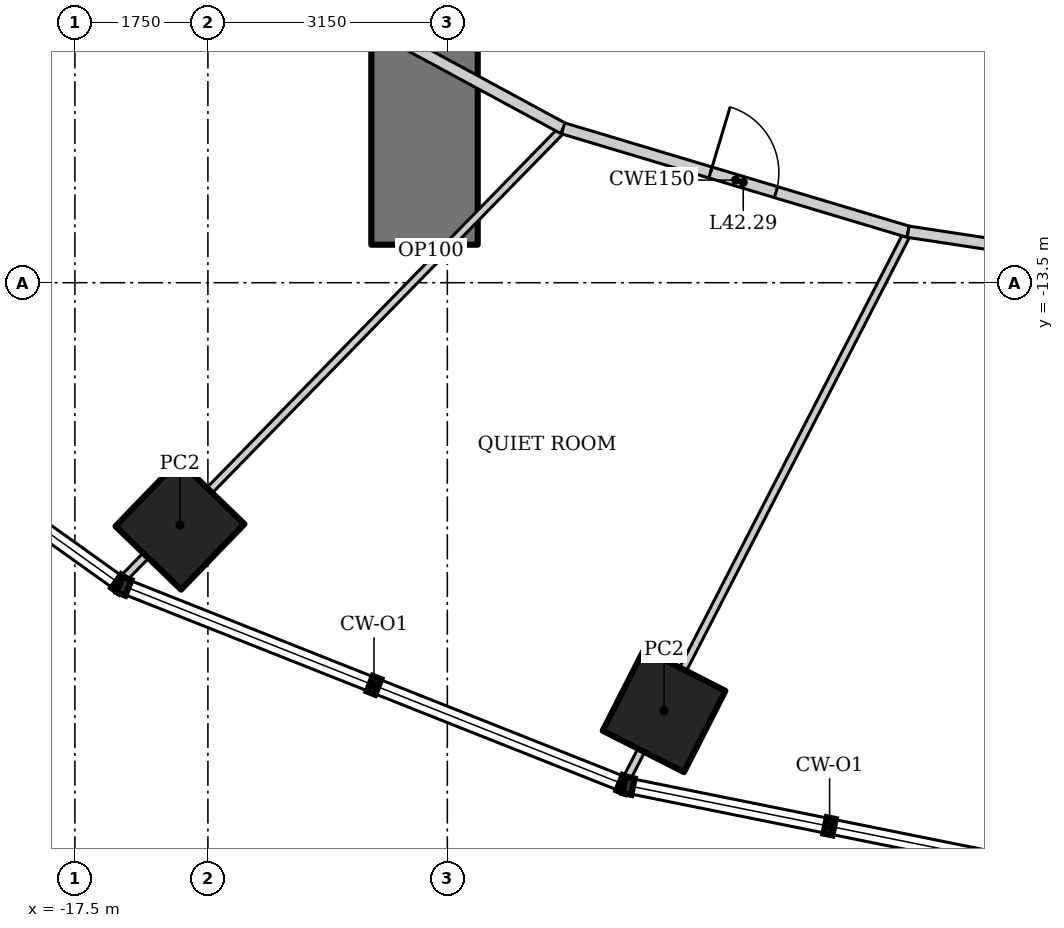
"""IFC4 building model, lengths in metres.
Left out: names, types, materials, properties, quantities, classifications, styles, units other than length and angle.
Written with IfcOpenShell. Run it as: python <this file> out.ifc"""

import sys

from ifc_helpers import new_model, si_unit, direction, frame, frame_2d, origin, origin_2d, place, context, subcontext, project, spatial, rectangle, hollow_rectangle, extrude, element, fill, save


model = new_model("IFC4")
c1 = context("Model", 3, precision=1e-05, world=origin(), true_north=direction((0.0, 1.0)))
c2 = subcontext(c1, "Body", "Model", "MODEL_VIEW")
j1 = project(units=[si_unit("LENGTHUNIT", "METRE"), si_unit("PLANEANGLEUNIT", "RADIAN")], contexts=[c1])
p1 = place(None, origin())
s1 = spatial("IfcSite", under=j1, at=p1, CompositionType="ELEMENT")
p2 = place(p1, origin())
s2 = spatial("IfcBuilding", under=s1, at=p2, CompositionType="ELEMENT")
p3 = place(p2, frame((0.0, 0.0, 180.4)))
s3 = spatial("IfcBuildingStorey", under=s2, at=p3, CompositionType="ELEMENT", Elevation=180.4)
for number, where, z_axis, x_axis in (
    (1, (-16.118, -16.69, 0.0), (0.0, 0.0, 1.0), (0.695, 0.719, 0.0)),
    (2, (-9.749, -19.133, 0.0), (0.0, 0.0, 1.0), (0.454, 0.891, 0.0)),
):
    element("IfcColumn", number, at=place(p3, frame(where, z_axis=z_axis, x_axis=x_axis)), inside=s3, PredefinedType="COLUMN", context=c2, shape_type="SweptSolid", body=[
        extrude(hollow_rectangle(XDim=1.2, YDim=1.2, WallThickness=0.1, at=origin_2d()), origin(), (0.0, 0.0, 1.0), 4.2),
    ])
p4 = place(p3, frame((-12.9, 13.0, 0.0), z_axis=(0.0, 0.0, 1.0), x_axis=(0.0, -1.0, 0.0)))
e3 = element("IfcWall", 3, at=p4, inside=s3, PredefinedType="SHEAR", context=c2, shape_type="SweptSolid", body=[
    extrude(rectangle(XDim=26.0, YDim=1.4, at=frame_2d((13.0, 0.0))), origin(), (0.0, 0.0, 1.0), 4.2),
])
p5 = place(p4, frame((12.1, 0.0, 0.0)))
e4 = element("IfcOpeningElement", 4, at=p5, cuts=e3, PredefinedType="OPENING", context=c2, shape_type="SweptSolid", body=[
    extrude(rectangle(XDim=1.8, YDim=2.1, at=frame_2d((0.9, 1.05))), frame((0.0, 0.71, 0.0), z_axis=(0.0, -1.0, 0.0), x_axis=(1.0, 0.0, 0.0)), (0.0, 0.0, 1.0), 1.42),
])
p6 = place(p3, frame((-16.882, -17.414, 0.0), z_axis=(0.0, 0.0, 1.0), x_axis=(0.698758056249, 0.715358077348, 0.0)))
e5 = element("IfcWall", 5, at=p6, inside=s3, PredefinedType="PARTITIONING", context=c2, shape_type="SweptSolid", body=[
    extrude(rectangle(XDim=8.31, YDim=0.1, at=frame_2d((4.155, 0.0))), origin(), (0.0, 0.0, 1.0), 3.321),
])
p7 = place(p3, frame((-10.253, -20.052, 0.0), z_axis=(0.0, 0.0, 1.0), x_axis=(0.457535449567, 0.889191381194, 0.0)))
e6 = element("IfcWall", 6, at=p7, inside=s3, PredefinedType="PARTITIONING", context=c2, shape_type="SweptSolid", body=[
    extrude(rectangle(XDim=8.123, YDim=0.1, at=frame_2d((4.061, 0.0))), origin(), (0.0, 0.0, 1.0), 3.349),
])
p8 = place(p3, frame((-15.696, -8.969, 0.0), z_axis=(0.0, 0.0, 1.0), x_axis=(0.879436285334, -0.476016617397, 0.0)))
e7 = element("IfcWall", 7, at=p8, inside=s3, PredefinedType="PARTITIONING", context=c2, shape_type="SweptSolid", body=[
    extrude(rectangle(XDim=5.253, YDim=0.15, at=frame_2d((2.626, 0.0))), origin(), (0.0, 0.0, 1.0), 4.05),
])
p9 = place(p3, frame((-11.076, -11.469, 0.0), z_axis=(0.0, 0.0, 1.0), x_axis=(0.957933992798, -0.286988615527, 0.0)))
e8 = element("IfcWall", 8, at=p9, inside=s3, PredefinedType="PARTITIONING", context=c2, shape_type="SweptSolid", body=[
    extrude(rectangle(XDim=4.738, YDim=0.15, at=frame_2d((2.369, 0.0))), origin(), (0.0, 0.0, 1.0), 4.05),
])
p10 = place(p9, frame((2.023, 0.0, 0.0)))
e9 = element("IfcOpeningElement", 9, at=p10, cuts=e8, PredefinedType="OPENING", context=c2, shape_type="SweptSolid", body=[
    extrude(rectangle(XDim=0.9, YDim=2.1, at=frame_2d((0.45, 1.05))), frame((0.0, 0.085, 0.0), z_axis=(0.0, -1.0, 0.0), x_axis=(1.0, 0.0, 0.0)), (0.0, 0.0, 1.0), 0.17),
])
p11 = place(p3, frame((-6.537, -12.829, 0.0), z_axis=(0.0, 0.0, 1.0), x_axis=(0.988668719464, -0.150113833987, 0.0)))
e10 = element("IfcWall", 10, at=p11, inside=s3, PredefinedType="PARTITIONING", context=c2, shape_type="SweptSolid", body=[
    extrude(rectangle(XDim=3.493, YDim=0.15, at=frame_2d((1.747, 0.0))), origin(), (0.0, 0.0, 1.0), 4.05),
])
p12 = place(p3, frame((-12.9, -13.0, 0.0), z_axis=(0.0, 0.0, 1.0), x_axis=(0.714845300066, -0.699282630253, 0.0)))
e11 = element("IfcWall", 11, at=p12, inside=s3, PredefinedType="PARTITIONING", context=c2, shape_type="SweptSolid", body=[
    extrude(rectangle(XDim=0.235, YDim=0.1, at=frame_2d((0.118, 0.0))), origin(), (0.0, 0.0, 1.0), 4.05),
])
p13 = place(p10, origin())
e12 = element("IfcDoor", 12, at=p13, inside=s3, OperationType="SINGLE_SWING_LEFT", PredefinedType="DOOR", context=c2, shape_type="SweptSolid", body=[
    extrude(rectangle(XDim=0.9, YDim=2.1, at=frame_2d((0.45, 1.05))), frame((0.0, 0.025, 0.0), z_axis=(0.0, -1.0, 0.0), x_axis=(1.0, 0.0, 0.0)), (0.0, 0.0, 1.0), 0.05),
])
fill(e9, e12)
save(model, sys.argv[1])
